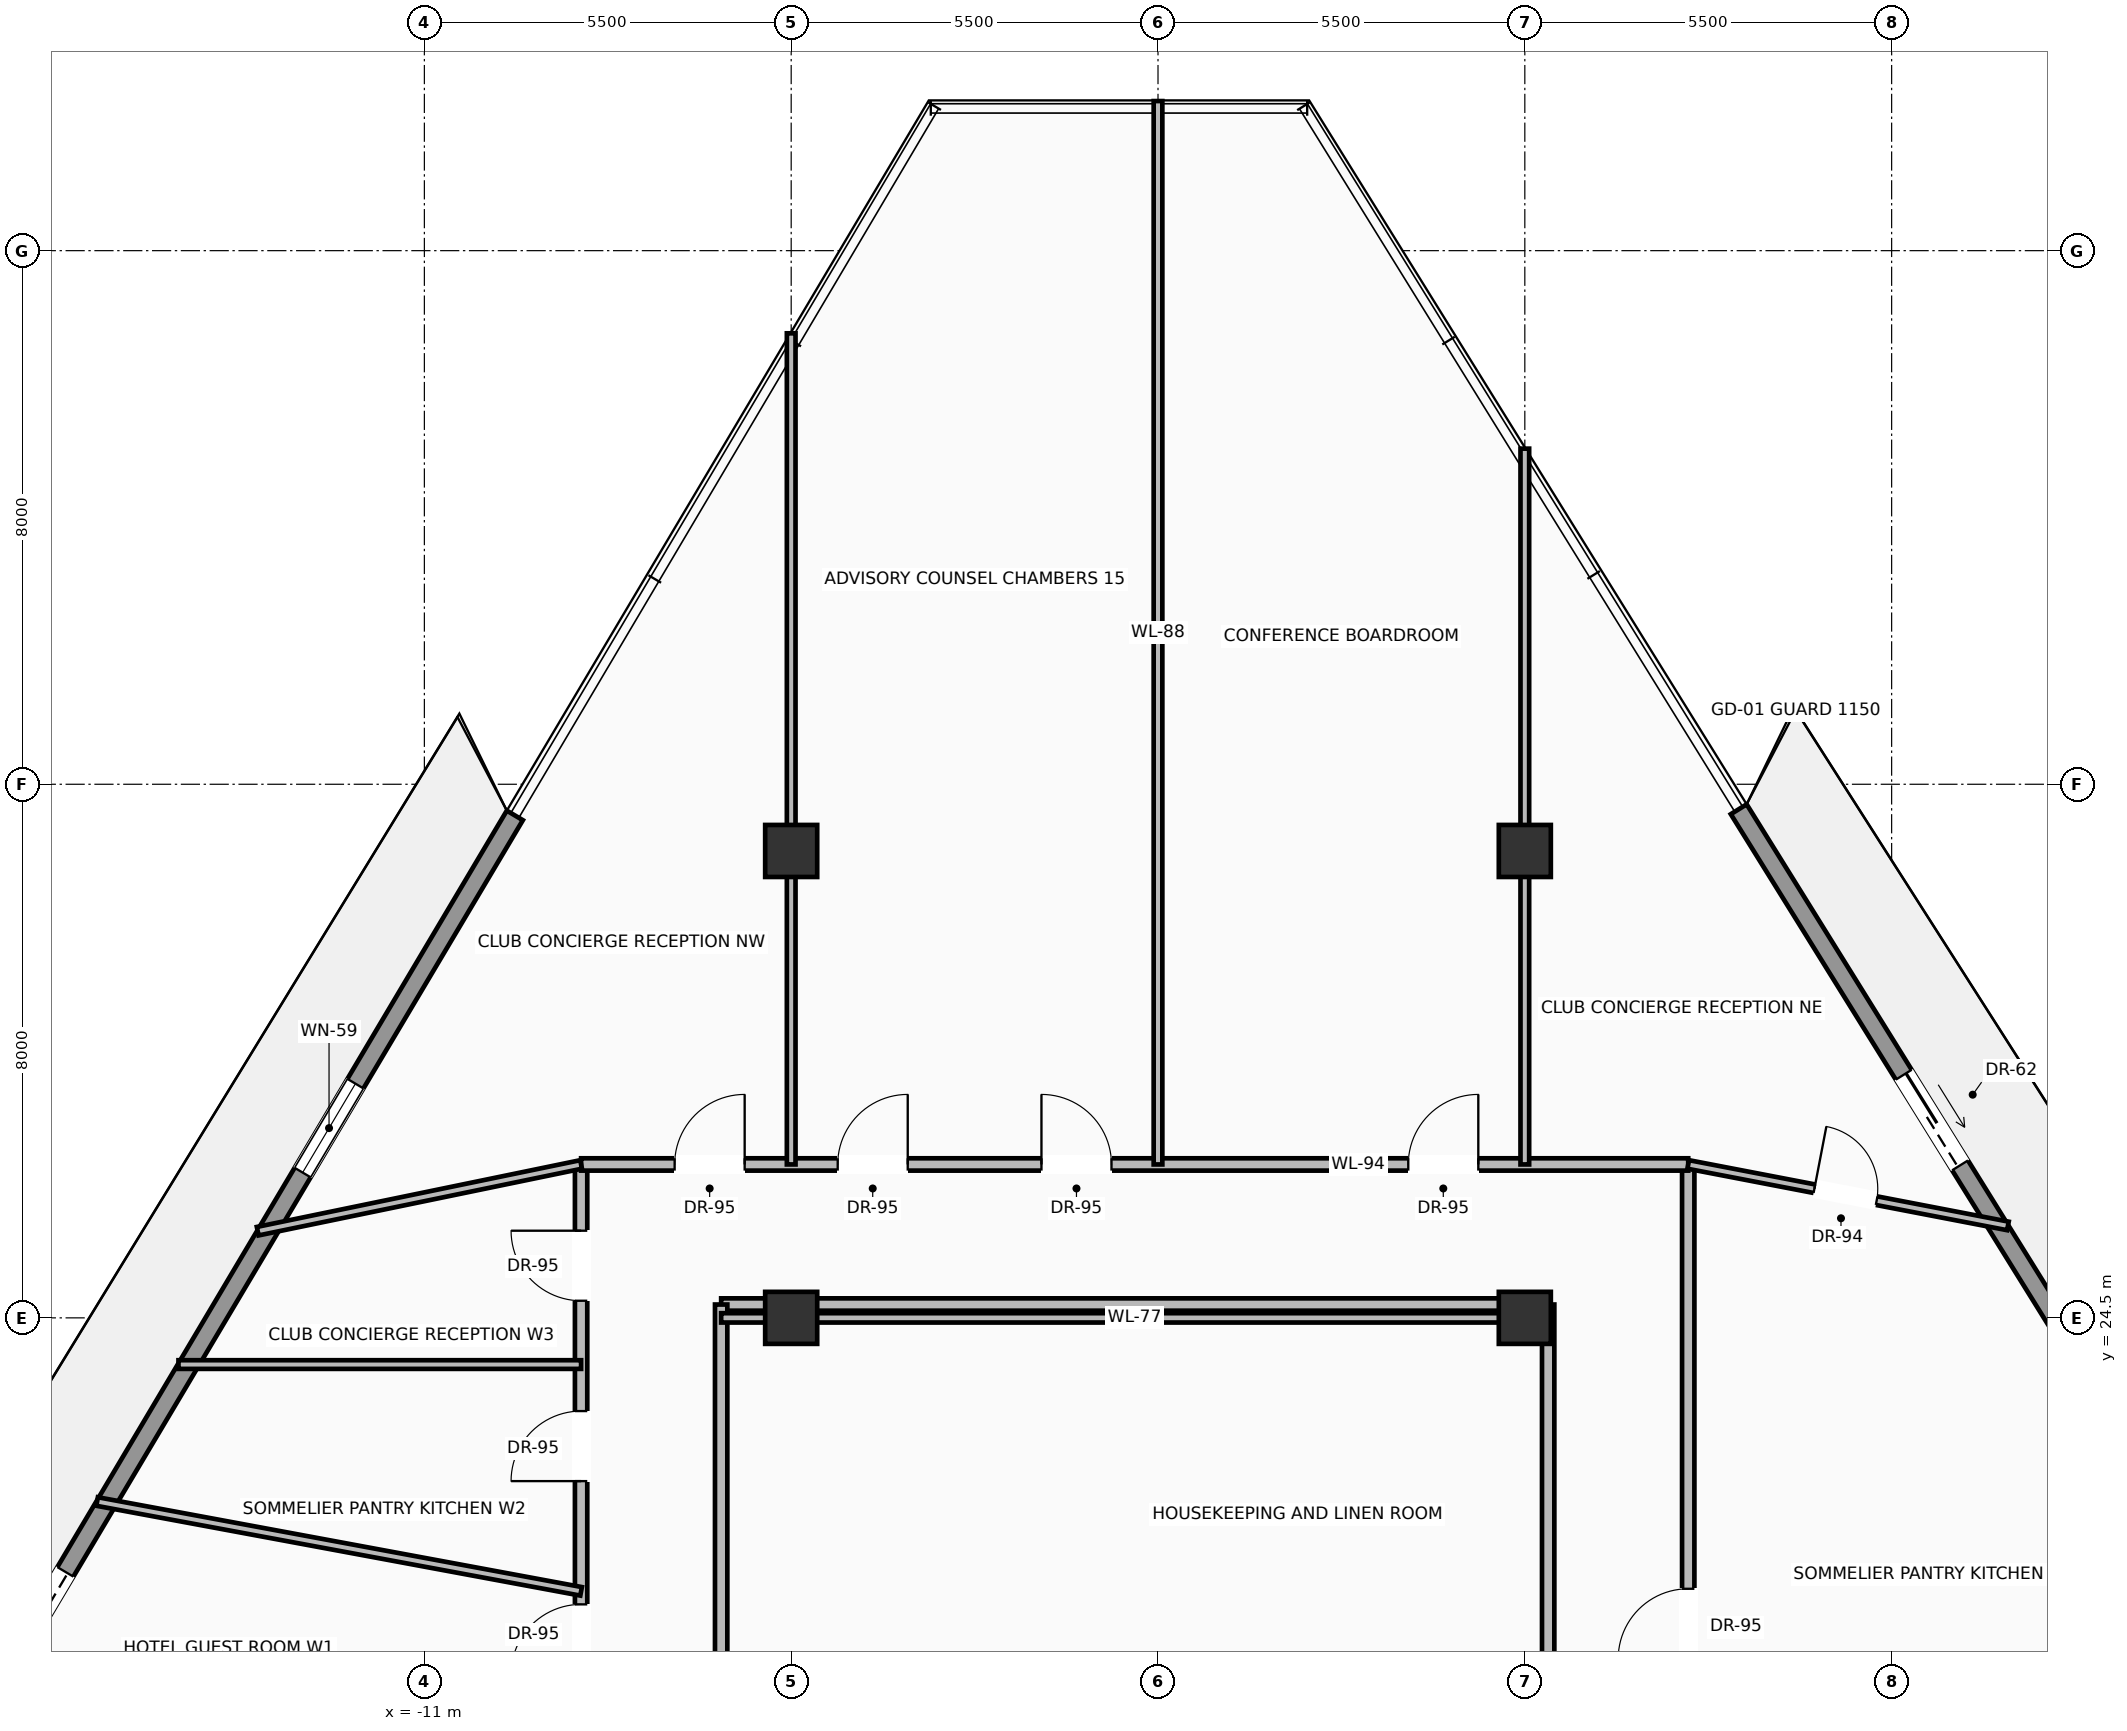
"""IFC4 building model, lengths in metres.
Left out: names, types, materials, properties, quantities, classifications, styles, units other than length and angle.
Written with IfcOpenShell. Run it as: python <this file> out.ifc"""

import sys

from ifc_helpers import new_model, si_unit, direction, frame, frame_2d, origin, origin_2d, place, context, subcontext, project, spatial, rectangle, extrude, source, transform, mapped, element, fill, save


model = new_model("IFC4")
c1 = context("Model", 3, precision=1e-05, world=origin(), true_north=direction((0.0, 1.0)))
c2 = subcontext(c1, "Body", "Model", "MODEL_VIEW")
j1 = project(units=[si_unit("LENGTHUNIT", "METRE"), si_unit("PLANEANGLEUNIT", "RADIAN")], contexts=[c1])
p1 = place(None, origin())
s1 = spatial("IfcSite", under=j1, at=p1, CompositionType="ELEMENT")
p2 = place(p1, origin())
s2 = spatial("IfcBuilding", under=s1, at=p2, CompositionType="ELEMENT")
p3 = place(p2, frame((0.0, 0.0, 230.35)))
s3 = spatial("IfcBuildingStorey", under=s2, at=p3, CompositionType="ELEMENT", Elevation=230.35)
m1 = source(origin(), c2, "Body", "SweptSolid", [
    extrude(rectangle(XDim=0.78, YDim=0.78, at=origin_2d()), origin(), (0.0, 0.0, 1.0), 3.45),
])
for number, where, z_axis, x_axis in (
    (1, (-5.5, 24.5, 0.0), (0.0, 0.0, 1.0), (1.0, 0.0, 0.0)),
    (2, (5.5, 24.5, 0.0), (0.0, 0.0, 1.0), (1.0, 0.0, 0.0)),
    (3, (-5.5, 31.5, 0.0), (0.0, 0.0, 1.0), (1.0, 0.0, 0.0)),
    (4, (5.5, 31.5, 0.0), (0.0, 0.0, 1.0), (1.0, 0.0, 0.0)),
):
    element("IfcColumn", number, at=place(p3, frame(where, z_axis=z_axis, x_axis=x_axis)), inside=s3, PredefinedType="COLUMN", context=c2, shape_type="MappedRepresentation", body=[
        mapped(m1, transform((0.0, 0.0, 0.0), scale=1.0)),
    ])
p4 = place(p3, frame((-19.586, 15.3, 0.0), z_axis=(0.0, 0.0, 1.0), x_axis=(0.510822157644, 0.859686409838, 0.0)))
e5 = element("IfcWall", 5, at=p4, inside=s3, PredefinedType="SOLIDWALL", context=c2, shape_type="SweptSolid", body=[
    extrude(rectangle(XDim=19.464, YDim=0.28, at=frame_2d((9.732, 0.0))), origin(), (0.0, 0.0, 1.0), 2.82),
])
p5 = place(p4, frame((4.671, 0.0, 0.0)))
e6 = element("IfcOpeningElement", 6, at=p5, cuts=e5, PredefinedType="OPENING", context=c2, shape_type="SweptSolid", body=[
    extrude(rectangle(XDim=1.6, YDim=2.35, at=frame_2d((0.8, 1.175))), frame((0.0, 0.15, 0.0), z_axis=(0.0, -1.0, 0.0), x_axis=(1.0, 0.0, 0.0)), (0.0, 0.0, 1.0), 0.3),
])
p6 = place(p4, frame((13.236, 0.0, 0.9)))
e7 = element("IfcOpeningElement", 7, at=p6, cuts=e5, PredefinedType="OPENING", context=c2, shape_type="SweptSolid", body=[
    extrude(rectangle(XDim=1.55, YDim=1.75, at=frame_2d((0.775, 0.875))), frame((0.0, 0.15, 0.0), z_axis=(0.0, -1.0, 0.0), x_axis=(1.0, 0.0, 0.0)), (0.0, 0.0, 1.0), 0.3),
])
p7 = place(p3, frame((8.708, 32.125, 0.0), z_axis=(0.0, 0.0, 1.0), x_axis=(0.527896829345, -0.849308505531, 0.0)))
e8 = element("IfcWall", 8, at=p7, inside=s3, PredefinedType="SOLIDWALL", context=c2, shape_type="SweptSolid", body=[
    extrude(rectangle(XDim=19.527, YDim=0.28, at=frame_2d((9.763, 0.0))), origin(), (0.0, 0.0, 1.0), 2.82),
])
p8 = place(p7, frame((4.686, 0.0, 0.0)))
e9 = element("IfcOpeningElement", 9, at=p8, cuts=e8, PredefinedType="OPENING", context=c2, shape_type="SweptSolid", body=[
    extrude(rectangle(XDim=1.6, YDim=2.35, at=frame_2d((0.8, 1.175))), frame((0.0, 0.15, 0.0), z_axis=(0.0, -1.0, 0.0), x_axis=(1.0, 0.0, 0.0)), (0.0, 0.0, 1.0), 0.3),
])
p9 = place(p7, frame((13.278, 0.0, 0.9)))
e10 = element("IfcOpeningElement", 10, at=p9, cuts=e8, PredefinedType="OPENING", context=c2, shape_type="SweptSolid", body=[
    extrude(rectangle(XDim=1.55, YDim=1.75, at=frame_2d((0.775, 0.875))), frame((0.0, 0.15, 0.0), z_axis=(0.0, -1.0, 0.0), x_axis=(1.0, 0.0, 0.0)), (0.0, 0.0, 1.0), 0.3),
])
p10 = place(p3, frame((-6.55, 24.7, 0.0), z_axis=(0.0, 0.0, 1.0), x_axis=(1.0, 0.0, 0.0)))
e11 = element("IfcWall", 11, at=p10, inside=s3, PredefinedType="PARTITIONING", context=c2, shape_type="SweptSolid", body=[
    extrude(rectangle(XDim=12.4, YDim=0.185, at=frame_2d((6.2, 0.0))), origin(), (0.0, 0.0, 1.0), 2.683),
])
for number, where, z_axis, x_axis in (
    (12, (-6.55, 18.4, 0.0), (0.0, 0.0, 1.0), (0.0, 1.0, 0.0)),
    (13, (5.85, 18.4, 0.0), (0.0, 0.0, 1.0), (0.0, 1.0, 0.0)),
):
    element("IfcWall", number, at=place(p3, frame(where, z_axis=z_axis, x_axis=x_axis)), inside=s3, PredefinedType="PARTITIONING", context=c2, shape_type="SweptSolid", body=[
        extrude(rectangle(XDim=6.3, YDim=0.185, at=frame_2d((3.15, 0.0))), origin(), (0.0, 0.0, 1.0), 3.232),
    ])
p11 = place(p3, frame((-8.65, 16.3, 0.0), z_axis=(0.0, 0.0, 1.0), x_axis=(0.0, 1.0, 0.0)))
e14 = element("IfcWall", 14, at=p11, inside=s3, PredefinedType="PARTITIONING", context=c2, shape_type="SweptSolid", body=[
    extrude(rectangle(XDim=10.5, YDim=0.185, at=frame_2d((5.25, 0.0))), origin(), (0.0, 0.0, 1.0), 3.232),
])
p12 = place(p11, frame((2.854, 0.0, 0.0)))
e15 = element("IfcOpeningElement", 15, at=p12, cuts=e14, PredefinedType="OPENING", context=c2, shape_type="SweptSolid", body=[
    extrude(rectangle(XDim=1.05, YDim=2.25, at=frame_2d((0.525, 1.125))), frame((0.0, 0.103, 0.0), z_axis=(0.0, -1.0, 0.0), x_axis=(1.0, 0.0, 0.0)), (0.0, 0.0, 1.0), 0.205),
])
p13 = place(p11, frame((5.752, 0.0, 0.0)))
e16 = element("IfcOpeningElement", 16, at=p13, cuts=e14, PredefinedType="OPENING", context=c2, shape_type="SweptSolid", body=[
    extrude(rectangle(XDim=1.05, YDim=2.25, at=frame_2d((0.525, 1.125))), frame((0.0, 0.103, 0.0), z_axis=(0.0, -1.0, 0.0), x_axis=(1.0, 0.0, 0.0)), (0.0, 0.0, 1.0), 0.205),
])
p14 = place(p11, frame((8.457, 0.0, 0.0)))
e17 = element("IfcOpeningElement", 17, at=p14, cuts=e14, PredefinedType="OPENING", context=c2, shape_type="SweptSolid", body=[
    extrude(rectangle(XDim=1.05, YDim=2.25, at=frame_2d((0.525, 1.125))), frame((0.0, 0.103, 0.0), z_axis=(0.0, -1.0, 0.0), x_axis=(1.0, 0.0, 0.0)), (0.0, 0.0, 1.0), 0.205),
])
p15 = place(p3, frame((7.95, 16.3, 0.0), z_axis=(0.0, 0.0, 1.0), x_axis=(0.0, 1.0, 0.0)))
e18 = element("IfcWall", 18, at=p15, inside=s3, PredefinedType="PARTITIONING", context=c2, shape_type="SweptSolid", body=[
    extrude(rectangle(XDim=10.5, YDim=0.185, at=frame_2d((5.25, 0.0))), origin(), (0.0, 0.0, 1.0), 3.232),
])
p16 = place(p15, frame((3.088, 0.0, 0.0)))
e19 = element("IfcOpeningElement", 19, at=p16, cuts=e18, PredefinedType="OPENING", context=c2, shape_type="SweptSolid", body=[
    extrude(rectangle(XDim=1.05, YDim=2.25, at=frame_2d((0.525, 1.125))), frame((0.0, 0.103, 0.0), z_axis=(0.0, -1.0, 0.0), x_axis=(1.0, 0.0, 0.0)), (0.0, 0.0, 1.0), 0.205),
])
p17 = place(p3, frame((-8.65, 26.8, 0.0), z_axis=(0.0, 0.0, 1.0), x_axis=(1.0, 0.0, 0.0)))
e20 = element("IfcWall", 20, at=p17, inside=s3, PredefinedType="PARTITIONING", context=c2, shape_type="SweptSolid", body=[
    extrude(rectangle(XDim=16.6, YDim=0.185, at=frame_2d((8.3, 0.0))), origin(), (0.0, 0.0, 1.0), 3.232),
])
p18 = place(p17, frame((3.847, 0.0, 0.0)))
e21 = element("IfcOpeningElement", 21, at=p18, cuts=e20, PredefinedType="OPENING", context=c2, shape_type="SweptSolid", body=[
    extrude(rectangle(XDim=1.05, YDim=2.25, at=frame_2d((0.525, 1.125))), frame((0.0, 0.103, 0.0), z_axis=(0.0, -1.0, 0.0), x_axis=(1.0, 0.0, 0.0)), (0.0, 0.0, 1.0), 0.205),
])
p19 = place(p17, frame((6.903, 0.0, 0.0)))
e22 = element("IfcOpeningElement", 22, at=p19, cuts=e20, PredefinedType="OPENING", context=c2, shape_type="SweptSolid", body=[
    extrude(rectangle(XDim=1.05, YDim=2.25, at=frame_2d((0.525, 1.125))), frame((0.0, 0.103, 0.0), z_axis=(0.0, -1.0, 0.0), x_axis=(1.0, 0.0, 0.0)), (0.0, 0.0, 1.0), 0.205),
])
p20 = place(p17, frame((12.403, 0.0, 0.0)))
e23 = element("IfcOpeningElement", 23, at=p20, cuts=e20, PredefinedType="OPENING", context=c2, shape_type="SweptSolid", body=[
    extrude(rectangle(XDim=1.05, YDim=2.25, at=frame_2d((0.525, 1.125))), frame((0.0, 0.103, 0.0), z_axis=(0.0, -1.0, 0.0), x_axis=(1.0, 0.0, 0.0)), (0.0, 0.0, 1.0), 0.205),
])
p21 = place(p17, frame((1.403, 0.0, 0.0)))
e24 = element("IfcOpeningElement", 24, at=p21, cuts=e20, PredefinedType="OPENING", context=c2, shape_type="SweptSolid", body=[
    extrude(rectangle(XDim=1.05, YDim=2.25, at=frame_2d((0.525, 1.125))), frame((0.0, 0.103, 0.0), z_axis=(0.0, -1.0, 0.0), x_axis=(1.0, 0.0, 0.0)), (0.0, 0.0, 1.0), 0.205),
])
p22 = place(p3, frame((-6.55, 24.5, 0.0), z_axis=(0.0, 0.0, 1.0), x_axis=(1.0, 0.0, 0.0)))
e25 = element("IfcWall", 25, at=p22, inside=s3, PredefinedType="PARTITIONING", context=c2, shape_type="SweptSolid", body=[
    extrude(rectangle(XDim=12.4, YDim=0.14, at=frame_2d((6.2, 0.0))), origin(), (0.0, 0.0, 1.0), 2.683),
])
p23 = place(p3, frame((-13.499, 25.799, 0.0), z_axis=(0.0, 0.0, 1.0), x_axis=(0.979359822394, 0.202124561301, 0.0)))
e26 = element("IfcWall", 26, at=p23, inside=s3, PredefinedType="PARTITIONING", context=c2, shape_type="SweptSolid", body=[
    extrude(rectangle(XDim=4.951, YDim=0.13, at=frame_2d((2.476, 0.0))), origin(), (0.0, 0.0, 1.0), 3.232),
])
p24 = place(p3, frame((7.95, 26.8, 0.0), z_axis=(0.0, 0.0, 1.0), x_axis=(0.982004306454, -0.188858524049, 0.0)))
e27 = element("IfcWall", 27, at=p24, inside=s3, PredefinedType="PARTITIONING", context=c2, shape_type="SweptSolid", body=[
    extrude(rectangle(XDim=4.881, YDim=0.13, at=frame_2d((2.441, 0.0))), origin(), (0.0, 0.0, 1.0), 3.232),
])
p25 = place(p24, frame((1.927, 0.0, 0.0)))
e28 = element("IfcOpeningElement", 28, at=p25, cuts=e27, PredefinedType="OPENING", context=c2, shape_type="SweptSolid", body=[
    extrude(rectangle(XDim=0.95, YDim=2.2, at=frame_2d((0.475, 1.1))), frame((0.0, 0.075, 0.0), z_axis=(0.0, -1.0, 0.0), x_axis=(1.0, 0.0, 0.0)), (0.0, 0.0, 1.0), 0.15),
])
p26 = place(p3, frame((-5.5, 26.8, 0.0), z_axis=(0.0, 0.0, 1.0), x_axis=(0.0, 1.0, 0.0)))
e29 = element("IfcWall", 29, at=p26, inside=s3, PredefinedType="PARTITIONING", context=c2, shape_type="SweptSolid", body=[
    extrude(rectangle(XDim=12.461, YDim=0.13, at=frame_2d((6.23, 0.0))), origin(), (0.0, 0.0, 1.0), 2.683),
])
p27 = place(p3, frame((5.5, 26.8, 0.0), z_axis=(0.0, 0.0, 1.0), x_axis=(0.0, 1.0, 0.0)))
e30 = element("IfcWall", 30, at=p27, inside=s3, PredefinedType="PARTITIONING", context=c2, shape_type="SweptSolid", body=[
    extrude(rectangle(XDim=10.732, YDim=0.13, at=frame_2d((5.366, 0.0))), origin(), (0.0, 0.0, 1.0), 2.683),
])
p28 = place(p3, frame((0.0, 26.8, 0.0), z_axis=(0.0, 0.0, 1.0), x_axis=(0.0, 1.0, 0.0)))
e31 = element("IfcWall", 31, at=p28, inside=s3, PredefinedType="PARTITIONING", context=c2, shape_type="SweptSolid", body=[
    extrude(rectangle(XDim=15.943, YDim=0.13, at=frame_2d((7.971, 0.0))), origin(), (0.0, 0.0, 1.0), 3.232),
])
p29 = place(p3, frame((-15.907, 21.747, 0.0), z_axis=(0.0, 0.0, 1.0), x_axis=(0.98321459924, -0.182452875674, 0.0)))
e32 = element("IfcWall", 32, at=p29, inside=s3, PredefinedType="PARTITIONING", context=c2, shape_type="SweptSolid", body=[
    extrude(rectangle(XDim=7.381, YDim=0.13, at=frame_2d((3.69, 0.0))), origin(), (0.0, 0.0, 1.0), 3.232),
])
p30 = place(p3, frame((-14.687, 23.8, 0.0), z_axis=(0.0, 0.0, 1.0), x_axis=(1.0, 0.0, 0.0)))
e33 = element("IfcWall", 33, at=p30, inside=s3, PredefinedType="PARTITIONING", context=c2, shape_type="SweptSolid", body=[
    extrude(rectangle(XDim=6.037, YDim=0.13, at=frame_2d((3.019, 0.0))), origin(), (0.0, 0.0, 1.0), 3.232),
])
m2 = source(origin(), c2, "Body", "SweptSolid", [
    extrude(rectangle(XDim=1.6, YDim=2.35, at=frame_2d((0.8, 1.175))), frame((0.0, 0.025, 0.0), z_axis=(0.0, -1.0, 0.0), x_axis=(1.0, 0.0, 0.0)), (0.0, 0.0, 1.0), 0.05),
])
p31 = place(p5, origin())
e34 = element("IfcDoor", 34, at=p31, inside=s3, OperationType="SLIDING_TO_LEFT", PredefinedType="DOOR", context=c2, shape_type="MappedRepresentation", body=[
    mapped(m2, transform((0.0, 0.0, 0.0), scale=1.0)),
])
fill(e6, e34)
m3 = source(origin(), c2, "Body", "SweptSolid", [
    extrude(rectangle(XDim=1.55, YDim=1.75, at=frame_2d((0.775, 0.875))), frame((0.0, 0.03, 0.0), z_axis=(0.0, -1.0, 0.0), x_axis=(1.0, 0.0, 0.0)), (0.0, 0.0, 1.0), 0.06),
])
p32 = place(p6, origin())
e35 = element("IfcWindow", 35, at=p32, inside=s3, PartitioningType="SINGLE_PANEL", PredefinedType="WINDOW", context=c2, shape_type="MappedRepresentation", body=[
    mapped(m3, transform((0.0, 0.0, 0.0), scale=1.0)),
])
fill(e7, e35)
p33 = place(p8, origin())
e36 = element("IfcDoor", 36, at=p33, inside=s3, OperationType="SLIDING_TO_RIGHT", PredefinedType="DOOR", context=c2, shape_type="MappedRepresentation", body=[
    mapped(m2, transform((0.0, 0.0, 0.0), scale=1.0)),
])
fill(e9, e36)
m4 = source(origin(), c2, "Body", "SweptSolid", [
    extrude(rectangle(XDim=1.05, YDim=2.25, at=frame_2d((0.525, 1.125))), frame((0.0, 0.025, 0.0), z_axis=(0.0, -1.0, 0.0), x_axis=(1.0, 0.0, 0.0)), (0.0, 0.0, 1.0), 0.05),
])
p34 = place(p12, origin())
e37 = element("IfcDoor", 37, at=p34, inside=s3, OperationType="SINGLE_SWING_LEFT", PredefinedType="DOOR", context=c2, shape_type="MappedRepresentation", body=[
    mapped(m4, transform((0.0, 0.0, 0.0), scale=1.0)),
])
fill(e15, e37)
p35 = place(p13, origin())
e38 = element("IfcDoor", 38, at=p35, inside=s3, OperationType="SINGLE_SWING_LEFT", PredefinedType="DOOR", context=c2, shape_type="MappedRepresentation", body=[
    mapped(m4, transform((0.0, 0.0, 0.0), scale=1.0)),
])
fill(e16, e38)
p36 = place(p14, origin())
e39 = element("IfcDoor", 39, at=p36, inside=s3, OperationType="SINGLE_SWING_RIGHT", PredefinedType="DOOR", context=c2, shape_type="MappedRepresentation", body=[
    mapped(m4, transform((0.0, 0.0, 0.0), scale=1.0)),
])
fill(e17, e39)
p37 = place(p16, origin())
e40 = element("IfcDoor", 40, at=p37, inside=s3, OperationType="SINGLE_SWING_LEFT", PredefinedType="DOOR", context=c2, shape_type="MappedRepresentation", body=[
    mapped(m4, transform((0.0, 0.0, 0.0), scale=1.0)),
])
fill(e19, e40)
p38 = place(p18, origin())
e41 = element("IfcDoor", 41, at=p38, inside=s3, OperationType="SINGLE_SWING_RIGHT", PredefinedType="DOOR", context=c2, shape_type="MappedRepresentation", body=[
    mapped(m4, transform((0.0, 0.0, 0.0), scale=1.0)),
])
fill(e21, e41)
p39 = place(p19, origin())
e42 = element("IfcDoor", 42, at=p39, inside=s3, OperationType="SINGLE_SWING_LEFT", PredefinedType="DOOR", context=c2, shape_type="MappedRepresentation", body=[
    mapped(m4, transform((0.0, 0.0, 0.0), scale=1.0)),
])
fill(e22, e42)
p40 = place(p20, origin())
e43 = element("IfcDoor", 43, at=p40, inside=s3, OperationType="SINGLE_SWING_RIGHT", PredefinedType="DOOR", context=c2, shape_type="MappedRepresentation", body=[
    mapped(m4, transform((0.0, 0.0, 0.0), scale=1.0)),
])
fill(e23, e43)
m5 = source(origin(), c2, "Body", "SweptSolid", [
    extrude(rectangle(XDim=0.95, YDim=2.2, at=frame_2d((0.475, 1.1))), frame((0.0, 0.025, 0.0), z_axis=(0.0, -1.0, 0.0), x_axis=(1.0, 0.0, 0.0)), (0.0, 0.0, 1.0), 0.05),
])
p41 = place(p25, origin())
e44 = element("IfcDoor", 44, at=p41, inside=s3, OperationType="SINGLE_SWING_LEFT", PredefinedType="DOOR", context=c2, shape_type="MappedRepresentation", body=[
    mapped(m5, transform((0.0, 0.0, 0.0), scale=1.0)),
])
fill(e28, e44)
p42 = place(p21, origin())
e45 = element("IfcDoor", 45, at=p42, inside=s3, OperationType="SINGLE_SWING_RIGHT", PredefinedType="DOOR", context=c2, shape_type="MappedRepresentation", body=[
    mapped(m4, transform((0.0, 0.0, 0.0), scale=1.0)),
])
fill(e24, e45)
save(model, sys.argv[1])
